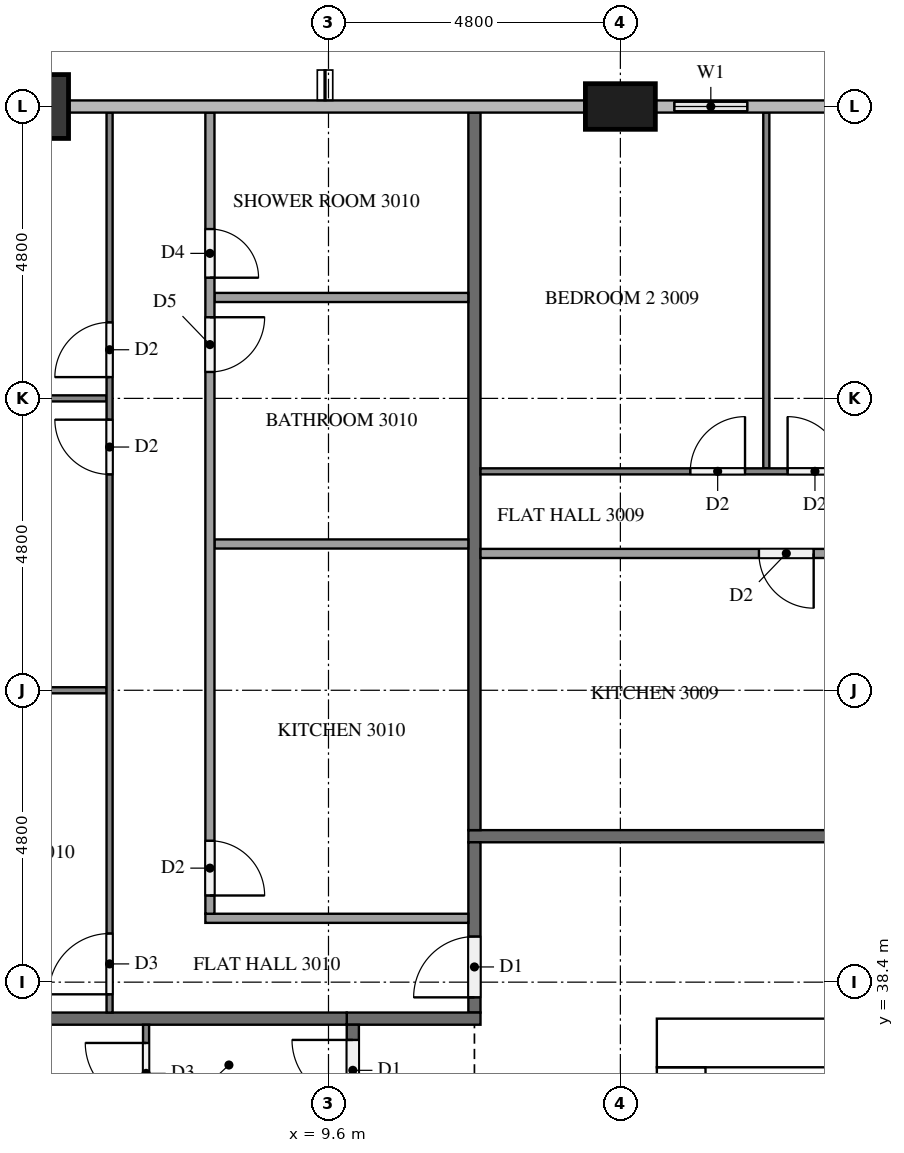
"""IFC4 building model, lengths in metres.
Left out: names, types, materials, properties, quantities, classifications, styles, units other than length and angle.
Written with IfcOpenShell. Run it as: python <this file> out.ifc"""

import sys

from ifc_helpers import new_model, si_unit, direction, frame, frame_2d, origin, origin_2d, place, context, subcontext, project, spatial, rectangle, extrude, element, fill, save


model = new_model("IFC4")
c1 = context("Model", 3, precision=1e-05, world=origin(), true_north=direction((0.0, 1.0)))
c2 = subcontext(c1, "Body", "Model", "MODEL_VIEW")
j1 = project(units=[si_unit("LENGTHUNIT", "METRE"), si_unit("PLANEANGLEUNIT", "RADIAN")], contexts=[c1])
p1 = place(None, origin())
s1 = spatial("IfcSite", under=j1, at=p1, CompositionType="ELEMENT")
p2 = place(p1, origin())
s2 = spatial("IfcBuilding", under=s1, at=p2, CompositionType="ELEMENT")
p3 = place(p2, frame((0.0, 0.0, 119.1)))
s3 = spatial("IfcBuildingStorey", under=s2, at=p3, CompositionType="ELEMENT", Elevation=119.1)
p4 = place(p3, frame((15.0, 37.4, 0.0), z_axis=(0.0, 0.0, 1.0), x_axis=(1.0, 0.0, 0.0)))
e1 = element("IfcWall", 1, at=p4, inside=s3, PredefinedType="SHEAR", context=c2, shape_type="SweptSolid", body=[
    extrude(rectangle(XDim=32.4, YDim=0.8, at=frame_2d((16.2, 0.0))), origin(), (0.0, 0.0, 1.0), 3.2),
])
p5 = place(p4, frame((15.3, 0.0, 0.0)))
e2 = element("IfcOpeningElement", 2, at=p5, cuts=e1, PredefinedType="OPENING", context=c2, shape_type="SweptSolid", body=[
    extrude(rectangle(XDim=1.8, YDim=2.1, at=frame_2d((0.9, 1.05))), frame((0.0, 0.41, 0.0), z_axis=(0.0, -1.0, 0.0), x_axis=(1.0, 0.0, 0.0)), (0.0, 0.0, 1.0), 0.82),
])
p6 = place(p4, frame((1.51, 0.0, 0.0)))
e3 = element("IfcOpeningElement", 3, at=p6, cuts=e1, PredefinedType="OPENING", context=c2, shape_type="SweptSolid", body=[
    extrude(rectangle(XDim=1.0, YDim=2.1, at=frame_2d((0.5, 1.05))), frame((0.0, 0.41, 0.0), z_axis=(0.0, -1.0, 0.0), x_axis=(1.0, 0.0, 0.0)), (0.0, 0.0, 1.0), 0.82),
])
p7 = place(p4, frame((5.11, 0.0, 0.0)))
e4 = element("IfcOpeningElement", 4, at=p7, cuts=e1, PredefinedType="OPENING", context=c2, shape_type="SweptSolid", body=[
    extrude(rectangle(XDim=1.0, YDim=2.1, at=frame_2d((0.5, 1.05))), frame((0.0, 0.41, 0.0), z_axis=(0.0, -1.0, 0.0), x_axis=(1.0, 0.0, 0.0)), (0.0, 0.0, 1.0), 0.82),
])
p8 = place(p3, frame((15.4, 15.8, 0.0), z_axis=(0.0, 0.0, 1.0), x_axis=(0.0, 1.0, 0.0)))
e5 = element("IfcWall", 5, at=p8, inside=s3, PredefinedType="SHEAR", context=c2, shape_type="SweptSolid", body=[
    extrude(rectangle(XDim=21.2, YDim=0.8, at=frame_2d((10.6, 0.0))), origin(), (0.0, 0.0, 1.0), 3.2),
])
p9 = place(p8, frame((4.96, 0.0, 0.0)))
e6 = element("IfcOpeningElement", 6, at=p9, cuts=e5, PredefinedType="OPENING", context=c2, shape_type="SweptSolid", body=[
    extrude(rectangle(XDim=1.2, YDim=2.1, at=frame_2d((0.6, 1.05))), frame((0.0, 0.41, 0.0), z_axis=(0.0, -1.0, 0.0), x_axis=(1.0, 0.0, 0.0)), (0.0, 0.0, 1.0), 0.82),
])
p10 = place(p3, frame((14.4, 52.8, 0.0), z_axis=(0.0, 0.0, 1.0), x_axis=(1.0, 0.0, 0.0)))
e7 = element("IfcColumn", 7, at=p10, inside=s3, PredefinedType="COLUMN", context=c2, shape_type="SweptSolid", body=[
    extrude(rectangle(XDim=1.15, YDim=0.75, at=origin_2d()), origin(), (0.0, 0.0, 1.0), 3.2),
])
p11 = place(p3, frame((4.8, 52.8, 0.0), z_axis=(0.0, 0.0, 1.0), x_axis=(1.0, 0.0, 0.0)))
e8 = element("IfcColumn", 8, at=p11, inside=s3, PredefinedType="COLUMN", context=c2, shape_type="SweptSolid", body=[
    extrude(rectangle(XDim=1.05, YDim=1.05, at=origin_2d()), origin(), (0.0, 0.0, 1.0), 3.2),
])
p12 = place(p3, frame((16.8, 52.8, 0.0), z_axis=(0.0, 0.0, 1.0), x_axis=(-1.0, 0.0, 0.0)))
e9 = element("IfcWall", 9, at=p12, inside=s3, PredefinedType="SOLIDWALL", context=c2, shape_type="SweptSolid", body=[
    extrude(rectangle(XDim=1.825, YDim=0.15, at=frame_2d((0.913, 0.0))), origin(), (0.0, 0.0, 1.0), 3.2),
])
p13 = place(p12, frame((0.312, 0.0, 0.9)))
e10 = element("IfcOpeningElement", 10, at=p13, cuts=e9, PredefinedType="OPENING", context=c2, shape_type="SweptSolid", body=[
    extrude(rectangle(XDim=1.2, YDim=1.4, at=frame_2d((0.6, 0.7))), frame((0.0, 0.085, 0.0), z_axis=(0.0, -1.0, 0.0), x_axis=(1.0, 0.0, 0.0)), (0.0, 0.0, 1.0), 0.17),
])
p14 = place(p3, frame((11.9, 40.8, 0.0), z_axis=(0.0, 0.0, 1.0), x_axis=(1.0, 0.0, 0.0)))
e11 = element("IfcWall", 11, at=p14, inside=s3, PredefinedType="PARTITIONING", context=c2, shape_type="SweptSolid", body=[
    extrude(rectangle(XDim=38.6, YDim=0.2, at=frame_2d((19.3, 0.0))), origin(), (0.0, 0.0, 1.0), 3.2),
])
p15 = place(p14, frame((37.15, 0.0, 0.0)))
e12 = element("IfcOpeningElement", 12, at=p15, cuts=e11, PredefinedType="OPENING", context=c2, shape_type="SweptSolid", body=[
    extrude(rectangle(XDim=1.0, YDim=2.1, at=frame_2d((0.5, 1.05))), frame((0.0, 0.11, 0.0), z_axis=(0.0, -1.0, 0.0), x_axis=(1.0, 0.0, 0.0)), (0.0, 0.0, 1.0), 0.22),
])
p16 = place(p14, frame((27.55, 0.0, 0.0)))
e13 = element("IfcOpeningElement", 13, at=p16, cuts=e11, PredefinedType="OPENING", context=c2, shape_type="SweptSolid", body=[
    extrude(rectangle(XDim=1.0, YDim=2.1, at=frame_2d((0.5, 1.05))), frame((0.0, 0.11, 0.0), z_axis=(0.0, -1.0, 0.0), x_axis=(1.0, 0.0, 0.0)), (0.0, 0.0, 1.0), 0.22),
])
p17 = place(p14, frame((13.15, 0.0, 0.0)))
e14 = element("IfcOpeningElement", 14, at=p17, cuts=e11, PredefinedType="OPENING", context=c2, shape_type="SweptSolid", body=[
    extrude(rectangle(XDim=1.0, YDim=2.1, at=frame_2d((0.5, 1.05))), frame((0.0, 0.11, 0.0), z_axis=(0.0, -1.0, 0.0), x_axis=(1.0, 0.0, 0.0)), (0.0, 0.0, 1.0), 0.22),
])
p18 = place(p3, frame((12.0, 37.9, 0.0), z_axis=(0.0, 0.0, 1.0), x_axis=(0.0, 1.0, 0.0)))
e15 = element("IfcWall", 15, at=p18, inside=s3, PredefinedType="PARTITIONING", context=c2, shape_type="SweptSolid", body=[
    extrude(rectangle(XDim=2.8, YDim=0.2, at=frame_2d((1.4, 0.0))), origin(), (0.0, 0.0, 1.0), 3.2),
])
p19 = place(p18, frame((0.25, 0.0, 0.0)))
e16 = element("IfcOpeningElement", 16, at=p19, cuts=e15, PredefinedType="OPENING", context=c2, shape_type="SweptSolid", body=[
    extrude(rectangle(XDim=1.0, YDim=2.1, at=frame_2d((0.5, 1.05))), frame((0.0, 0.11, 0.0), z_axis=(0.0, -1.0, 0.0), x_axis=(1.0, 0.0, 0.0)), (0.0, 0.0, 1.0), 0.22),
])
p20 = place(p3, frame((12.1, 37.8, 0.0), z_axis=(0.0, 0.0, 1.0), x_axis=(-1.0, 0.0, 0.0)))
e17 = element("IfcWall", 17, at=p20, inside=s3, PredefinedType="PARTITIONING", context=c2, shape_type="SweptSolid", body=[
    extrude(rectangle(XDim=2.2, YDim=0.2, at=frame_2d((1.1, 0.0))), origin(), (0.0, 0.0, 1.0), 3.2),
])
p21 = place(p3, frame((10.0, 15.1, 0.0), z_axis=(0.0, 0.0, 1.0), x_axis=(0.0, 1.0, 0.0)))
e18 = element("IfcWall", 18, at=p21, inside=s3, PredefinedType="PARTITIONING", context=c2, shape_type="SweptSolid", body=[
    extrude(rectangle(XDim=22.6, YDim=0.2, at=frame_2d((11.3, 0.0))), origin(), (0.0, 0.0, 1.0), 3.2),
])
p22 = place(p21, frame((21.35, 0.0, 0.0)))
e19 = element("IfcOpeningElement", 19, at=p22, cuts=e18, PredefinedType="OPENING", context=c2, shape_type="SweptSolid", body=[
    extrude(rectangle(XDim=1.0, YDim=2.1, at=frame_2d((0.5, 1.05))), frame((0.0, 0.11, 0.0), z_axis=(0.0, -1.0, 0.0), x_axis=(1.0, 0.0, 0.0)), (0.0, 0.0, 1.0), 0.22),
])
p23 = place(p21, frame((12.35, 0.0, 0.0)))
e20 = element("IfcOpeningElement", 20, at=p23, cuts=e18, PredefinedType="OPENING", context=c2, shape_type="SweptSolid", body=[
    extrude(rectangle(XDim=1.0, YDim=2.1, at=frame_2d((0.5, 1.05))), frame((0.0, 0.11, 0.0), z_axis=(0.0, -1.0, 0.0), x_axis=(1.0, 0.0, 0.0)), (0.0, 0.0, 1.0), 0.22),
])
p24 = place(p3, frame((12.0, 52.7, 0.0), z_axis=(0.0, 0.0, 1.0), x_axis=(0.0, -1.0, 0.0)))
e21 = element("IfcWall", 21, at=p24, inside=s3, PredefinedType="PARTITIONING", context=c2, shape_type="SweptSolid", body=[
    extrude(rectangle(XDim=11.8, YDim=0.2, at=frame_2d((5.9, 0.0))), origin(), (0.0, 0.0, 1.0), 3.2),
])
p25 = place(p3, frame((0.375, 37.8, 0.0), z_axis=(0.0, 0.0, 1.0), x_axis=(1.0, 0.0, 0.0)))
e22 = element("IfcWall", 22, at=p25, inside=s3, PredefinedType="PARTITIONING", context=c2, shape_type="SweptSolid", body=[
    extrude(rectangle(XDim=9.525, YDim=0.2, at=frame_2d((4.762, 0.0))), origin(), (0.0, 0.0, 1.0), 3.2),
])
p26 = place(p3, frame((16.8, 46.85, 0.0), z_axis=(0.0, 0.0, 1.0), x_axis=(0.0, 1.0, 0.0)))
e23 = element("IfcWall", 23, at=p26, inside=s3, PredefinedType="PARTITIONING", context=c2, shape_type="SweptSolid", body=[
    extrude(rectangle(XDim=5.85, YDim=0.1, at=frame_2d((2.925, 0.0))), origin(), (0.0, 0.0, 1.0), 3.2),
])
p27 = place(p3, frame((12.1, 46.8, 0.0), z_axis=(0.0, 0.0, 1.0), x_axis=(1.0, 0.0, 0.0)))
e24 = element("IfcWall", 24, at=p27, inside=s3, PredefinedType="PARTITIONING", context=c2, shape_type="SweptSolid", body=[
    extrude(rectangle(XDim=14.2, YDim=0.1, at=frame_2d((7.1, 0.0))), origin(), (0.0, 0.0, 1.0), 3.2),
])
p28 = place(p27, frame((12.9, 0.0, 0.0)))
e25 = element("IfcOpeningElement", 25, at=p28, cuts=e24, PredefinedType="OPENING", context=c2, shape_type="SweptSolid", body=[
    extrude(rectangle(XDim=1.0, YDim=2.1, at=frame_2d((0.5, 1.05))), frame((0.0, 0.06, 0.0), z_axis=(0.0, -1.0, 0.0), x_axis=(1.0, 0.0, 0.0)), (0.0, 0.0, 1.0), 0.12),
])
p29 = place(p27, frame((5.05, 0.0, 0.0)))
e26 = element("IfcOpeningElement", 26, at=p29, cuts=e24, PredefinedType="OPENING", context=c2, shape_type="SweptSolid", body=[
    extrude(rectangle(XDim=0.9, YDim=2.1, at=frame_2d((0.45, 1.05))), frame((0.0, 0.06, 0.0), z_axis=(0.0, -1.0, 0.0), x_axis=(1.0, 0.0, 0.0)), (0.0, 0.0, 1.0), 0.12),
])
p30 = place(p27, frame((3.45, 0.0, 0.0)))
e27 = element("IfcOpeningElement", 27, at=p30, cuts=e24, PredefinedType="OPENING", context=c2, shape_type="SweptSolid", body=[
    extrude(rectangle(XDim=0.9, YDim=2.1, at=frame_2d((0.45, 1.05))), frame((0.0, 0.06, 0.0), z_axis=(0.0, -1.0, 0.0), x_axis=(1.0, 0.0, 0.0)), (0.0, 0.0, 1.0), 0.12),
])
p31 = place(p3, frame((24.675, 45.45, 0.0), z_axis=(0.0, 0.0, 1.0), x_axis=(-1.0, 0.0, 0.0)))
e28 = element("IfcWall", 28, at=p31, inside=s3, PredefinedType="PARTITIONING", context=c2, shape_type="SweptSolid", body=[
    extrude(rectangle(XDim=12.575, YDim=0.15, at=frame_2d((6.288, 0.0))), origin(), (0.0, 0.0, 1.0), 3.2),
])
p32 = place(p31, frame((0.3, 0.0, 0.0)))
e29 = element("IfcOpeningElement", 29, at=p32, cuts=e28, PredefinedType="OPENING", context=c2, shape_type="SweptSolid", body=[
    extrude(rectangle(XDim=0.9, YDim=2.1, at=frame_2d((0.45, 1.05))), frame((0.0, 0.085, 0.0), z_axis=(0.0, -1.0, 0.0), x_axis=(1.0, 0.0, 0.0)), (0.0, 0.0, 1.0), 0.17),
])
p33 = place(p31, frame((5.646, 0.0, 0.0)))
e30 = element("IfcOpeningElement", 30, at=p33, cuts=e28, PredefinedType="OPENING", context=c2, shape_type="SweptSolid", body=[
    extrude(rectangle(XDim=0.8, YDim=2.1, at=frame_2d((0.4, 1.05))), frame((0.0, 0.085, 0.0), z_axis=(0.0, -1.0, 0.0), x_axis=(1.0, 0.0, 0.0)), (0.0, 0.0, 1.0), 0.17),
])
p34 = place(p31, frame((7.096, 0.0, 0.0)))
e31 = element("IfcOpeningElement", 31, at=p34, cuts=e28, PredefinedType="OPENING", context=c2, shape_type="SweptSolid", body=[
    extrude(rectangle(XDim=0.9, YDim=2.1, at=frame_2d((0.45, 1.05))), frame((0.0, 0.085, 0.0), z_axis=(0.0, -1.0, 0.0), x_axis=(1.0, 0.0, 0.0)), (0.0, 0.0, 1.0), 0.17),
])
p35 = place(p3, frame((5.95, 43.2, 0.0), z_axis=(0.0, 0.0, 1.0), x_axis=(-1.0, 0.0, 0.0)))
e32 = element("IfcWall", 32, at=p35, inside=s3, PredefinedType="PARTITIONING", context=c2, shape_type="SweptSolid", body=[
    extrude(rectangle(XDim=5.85, YDim=0.1, at=frame_2d((2.925, 0.0))), origin(), (0.0, 0.0, 1.0), 3.2),
])
p36 = place(p3, frame((5.95, 48.0, 0.0), z_axis=(0.0, 0.0, 1.0), x_axis=(-1.0, 0.0, 0.0)))
e33 = element("IfcWall", 33, at=p36, inside=s3, PredefinedType="PARTITIONING", context=c2, shape_type="SweptSolid", body=[
    extrude(rectangle(XDim=5.425, YDim=0.1, at=frame_2d((2.712, 0.0))), origin(), (0.0, 0.0, 1.0), 3.2),
])
p37 = place(p3, frame((6.0, 37.9, 0.0), z_axis=(0.0, 0.0, 1.0), x_axis=(0.0, 1.0, 0.0)))
e34 = element("IfcWall", 34, at=p37, inside=s3, PredefinedType="PARTITIONING", context=c2, shape_type="SweptSolid", body=[
    extrude(rectangle(XDim=14.8, YDim=0.1, at=frame_2d((7.4, 0.0))), origin(), (0.0, 0.0, 1.0), 3.2),
])
p38 = place(p37, frame((0.3, 0.0, 0.0)))
e35 = element("IfcOpeningElement", 35, at=p38, cuts=e34, PredefinedType="OPENING", context=c2, shape_type="SweptSolid", body=[
    extrude(rectangle(XDim=1.0, YDim=2.1, at=frame_2d((0.5, 1.05))), frame((0.0, 0.06, 0.0), z_axis=(0.0, -1.0, 0.0), x_axis=(1.0, 0.0, 0.0)), (0.0, 0.0, 1.0), 0.12),
])
p39 = place(p37, frame((8.85, 0.0, 0.0)))
e36 = element("IfcOpeningElement", 36, at=p39, cuts=e34, PredefinedType="OPENING", context=c2, shape_type="SweptSolid", body=[
    extrude(rectangle(XDim=0.9, YDim=2.1, at=frame_2d((0.45, 1.05))), frame((0.0, 0.06, 0.0), z_axis=(0.0, -1.0, 0.0), x_axis=(1.0, 0.0, 0.0)), (0.0, 0.0, 1.0), 0.12),
])
p40 = place(p37, frame((10.45, 0.0, 0.0)))
e37 = element("IfcOpeningElement", 37, at=p40, cuts=e34, PredefinedType="OPENING", context=c2, shape_type="SweptSolid", body=[
    extrude(rectangle(XDim=0.9, YDim=2.1, at=frame_2d((0.45, 1.05))), frame((0.0, 0.06, 0.0), z_axis=(0.0, -1.0, 0.0), x_axis=(1.0, 0.0, 0.0)), (0.0, 0.0, 1.0), 0.12),
])
for number, where, z_axis, x_axis in (
    (38, (11.9, 45.606, 0.0), (0.0, 0.0, 1.0), (-1.0, 0.0, 0.0)),
    (39, (11.9, 49.66, 0.0), (0.0, 0.0, 1.0), (-1.0, 0.0, 0.0)),
):
    element("IfcWall", number, at=place(p3, frame(where, z_axis=z_axis, x_axis=x_axis)), inside=s3, PredefinedType="PARTITIONING", context=c2, shape_type="SweptSolid", body=[
        extrude(rectangle(XDim=4.175, YDim=0.15, at=frame_2d((2.087, 0.0))), origin(), (0.0, 0.0, 1.0), 3.2),
    ])
p41 = place(p3, frame((11.9, 39.45, 0.0), z_axis=(0.0, 0.0, 1.0), x_axis=(-1.0, 0.0, 0.0)))
e40 = element("IfcWall", 40, at=p41, inside=s3, PredefinedType="PARTITIONING", context=c2, shape_type="SweptSolid", body=[
    extrude(rectangle(XDim=4.325, YDim=0.15, at=frame_2d((2.163, 0.0))), origin(), (0.0, 0.0, 1.0), 3.2),
])
p42 = place(p3, frame((7.65, 52.7, 0.0), z_axis=(0.0, 0.0, 1.0), x_axis=(0.0, -1.0, 0.0)))
e41 = element("IfcWall", 41, at=p42, inside=s3, PredefinedType="PARTITIONING", context=c2, shape_type="SweptSolid", body=[
    extrude(rectangle(XDim=13.175, YDim=0.15, at=frame_2d((6.587, 0.0))), origin(), (0.0, 0.0, 1.0), 3.2),
])
p43 = place(p42, frame((11.975, 0.0, 0.0)))
e42 = element("IfcOpeningElement", 42, at=p43, cuts=e41, PredefinedType="OPENING", context=c2, shape_type="SweptSolid", body=[
    extrude(rectangle(XDim=0.9, YDim=2.1, at=frame_2d((0.45, 1.05))), frame((0.0, 0.085, 0.0), z_axis=(0.0, -1.0, 0.0), x_axis=(1.0, 0.0, 0.0)), (0.0, 0.0, 1.0), 0.17),
])
p44 = place(p42, frame((3.365, 0.0, 0.0)))
e43 = element("IfcOpeningElement", 43, at=p44, cuts=e41, PredefinedType="OPENING", context=c2, shape_type="SweptSolid", body=[
    extrude(rectangle(XDim=0.9, YDim=2.1, at=frame_2d((0.45, 1.05))), frame((0.0, 0.085, 0.0), z_axis=(0.0, -1.0, 0.0), x_axis=(1.0, 0.0, 0.0)), (0.0, 0.0, 1.0), 0.17),
])
p45 = place(p42, frame((1.915, 0.0, 0.0)))
e44 = element("IfcOpeningElement", 44, at=p45, cuts=e41, PredefinedType="OPENING", context=c2, shape_type="SweptSolid", body=[
    extrude(rectangle(XDim=0.8, YDim=2.1, at=frame_2d((0.4, 1.05))), frame((0.0, 0.085, 0.0), z_axis=(0.0, -1.0, 0.0), x_axis=(1.0, 0.0, 0.0)), (0.0, 0.0, 1.0), 0.17),
])
p46 = place(p3, frame((6.6, 28.9, 0.0), z_axis=(0.0, 0.0, 1.0), x_axis=(0.0, 1.0, 0.0)))
e45 = element("IfcWall", 45, at=p46, inside=s3, PredefinedType="PARTITIONING", context=c2, shape_type="SweptSolid", body=[
    extrude(rectangle(XDim=8.8, YDim=0.1, at=frame_2d((4.4, 0.0))), origin(), (0.0, 0.0, 1.0), 3.2),
])
p47 = place(p46, frame((7.5, 0.0, 0.0)))
e46 = element("IfcOpeningElement", 46, at=p47, cuts=e45, PredefinedType="OPENING", context=c2, shape_type="SweptSolid", body=[
    extrude(rectangle(XDim=1.0, YDim=2.1, at=frame_2d((0.5, 1.05))), frame((0.0, 0.06, 0.0), z_axis=(0.0, -1.0, 0.0), x_axis=(1.0, 0.0, 0.0)), (0.0, 0.0, 1.0), 0.12),
])
p48 = place(p46, frame((0.3, 0.0, 0.0)))
e47 = element("IfcOpeningElement", 47, at=p48, cuts=e45, PredefinedType="OPENING", context=c2, shape_type="SweptSolid", body=[
    extrude(rectangle(XDim=0.9, YDim=2.1, at=frame_2d((0.45, 1.05))), frame((0.0, 0.06, 0.0), z_axis=(0.0, -1.0, 0.0), x_axis=(1.0, 0.0, 0.0)), (0.0, 0.0, 1.0), 0.12),
])
p49 = place(p13, origin())
e48 = element("IfcWindow", 48, at=p49, inside=s3, PartitioningType="SINGLE_PANEL", PredefinedType="WINDOW", context=c2, shape_type="SweptSolid", body=[
    extrude(rectangle(XDim=1.2, YDim=1.4, at=frame_2d((0.6, 0.7))), frame((0.0, 0.03, 0.0), z_axis=(0.0, -1.0, 0.0), x_axis=(1.0, 0.0, 0.0)), (0.0, 0.0, 1.0), 0.06),
])
fill(e10, e48)
p50 = place(p6, origin())
e49 = element("IfcDoor", 49, at=p50, inside=s3, OperationType="SINGLE_SWING_LEFT", PredefinedType="DOOR", context=c2, shape_type="SweptSolid", body=[
    extrude(rectangle(XDim=1.0, YDim=2.1, at=frame_2d((0.5, 1.05))), frame((0.0, 0.025, 0.0), z_axis=(0.0, -1.0, 0.0), x_axis=(1.0, 0.0, 0.0)), (0.0, 0.0, 1.0), 0.05),
])
fill(e3, e49)
p51 = place(p19, origin())
e50 = element("IfcDoor", 50, at=p51, inside=s3, OperationType="SINGLE_SWING_LEFT", PredefinedType="DOOR", context=c2, shape_type="SweptSolid", body=[
    extrude(rectangle(XDim=1.0, YDim=2.1, at=frame_2d((0.5, 1.05))), frame((0.0, 0.025, 0.0), z_axis=(0.0, -1.0, 0.0), x_axis=(1.0, 0.0, 0.0)), (0.0, 0.0, 1.0), 0.05),
])
fill(e16, e50)
p52 = place(p22, origin())
e51 = element("IfcDoor", 51, at=p52, inside=s3, OperationType="SINGLE_SWING_RIGHT", PredefinedType="DOOR", context=c2, shape_type="SweptSolid", body=[
    extrude(rectangle(XDim=1.0, YDim=2.1, at=frame_2d((0.5, 1.05))), frame((0.0, 0.025, 0.0), z_axis=(0.0, -1.0, 0.0), x_axis=(1.0, 0.0, 0.0)), (0.0, 0.0, 1.0), 0.05),
])
fill(e19, e51)
p53 = place(p29, origin())
e52 = element("IfcDoor", 52, at=p53, inside=s3, OperationType="SINGLE_SWING_LEFT", PredefinedType="DOOR", context=c2, shape_type="SweptSolid", body=[
    extrude(rectangle(XDim=0.9, YDim=2.1, at=frame_2d((0.45, 1.05))), frame((0.0, 0.025, 0.0), z_axis=(0.0, -1.0, 0.0), x_axis=(1.0, 0.0, 0.0)), (0.0, 0.0, 1.0), 0.05),
])
fill(e26, e52)
p54 = place(p30, origin())
e53 = element("IfcDoor", 53, at=p54, inside=s3, OperationType="SINGLE_SWING_RIGHT", PredefinedType="DOOR", context=c2, shape_type="SweptSolid", body=[
    extrude(rectangle(XDim=0.9, YDim=2.1, at=frame_2d((0.45, 1.05))), frame((0.0, 0.025, 0.0), z_axis=(0.0, -1.0, 0.0), x_axis=(1.0, 0.0, 0.0)), (0.0, 0.0, 1.0), 0.05),
])
fill(e27, e53)
p55 = place(p34, origin())
e54 = element("IfcDoor", 54, at=p55, inside=s3, OperationType="SINGLE_SWING_LEFT", PredefinedType="DOOR", context=c2, shape_type="SweptSolid", body=[
    extrude(rectangle(XDim=0.9, YDim=2.1, at=frame_2d((0.45, 1.05))), frame((0.0, 0.025, 0.0), z_axis=(0.0, -1.0, 0.0), x_axis=(1.0, 0.0, 0.0)), (0.0, 0.0, 1.0), 0.05),
])
fill(e31, e54)
p56 = place(p38, origin())
e55 = element("IfcDoor", 55, at=p56, inside=s3, OperationType="SINGLE_SWING_LEFT", PredefinedType="DOOR", context=c2, shape_type="SweptSolid", body=[
    extrude(rectangle(XDim=1.0, YDim=2.1, at=frame_2d((0.5, 1.05))), frame((0.0, 0.025, 0.0), z_axis=(0.0, -1.0, 0.0), x_axis=(1.0, 0.0, 0.0)), (0.0, 0.0, 1.0), 0.05),
])
fill(e35, e55)
p57 = place(p39, origin())
e56 = element("IfcDoor", 56, at=p57, inside=s3, OperationType="SINGLE_SWING_RIGHT", PredefinedType="DOOR", context=c2, shape_type="SweptSolid", body=[
    extrude(rectangle(XDim=0.9, YDim=2.1, at=frame_2d((0.45, 1.05))), frame((0.0, 0.025, 0.0), z_axis=(0.0, -1.0, 0.0), x_axis=(1.0, 0.0, 0.0)), (0.0, 0.0, 1.0), 0.05),
])
fill(e36, e56)
p58 = place(p40, origin())
e57 = element("IfcDoor", 57, at=p58, inside=s3, OperationType="SINGLE_SWING_LEFT", PredefinedType="DOOR", context=c2, shape_type="SweptSolid", body=[
    extrude(rectangle(XDim=0.9, YDim=2.1, at=frame_2d((0.45, 1.05))), frame((0.0, 0.025, 0.0), z_axis=(0.0, -1.0, 0.0), x_axis=(1.0, 0.0, 0.0)), (0.0, 0.0, 1.0), 0.05),
])
fill(e37, e57)
p59 = place(p43, origin())
e58 = element("IfcDoor", 58, at=p59, inside=s3, OperationType="SINGLE_SWING_RIGHT", PredefinedType="DOOR", context=c2, shape_type="SweptSolid", body=[
    extrude(rectangle(XDim=0.9, YDim=2.1, at=frame_2d((0.45, 1.05))), frame((0.0, 0.025, 0.0), z_axis=(0.0, -1.0, 0.0), x_axis=(1.0, 0.0, 0.0)), (0.0, 0.0, 1.0), 0.05),
])
fill(e42, e58)
p60 = place(p44, origin())
e59 = element("IfcDoor", 59, at=p60, inside=s3, OperationType="SINGLE_SWING_LEFT", PredefinedType="DOOR", context=c2, shape_type="SweptSolid", body=[
    extrude(rectangle(XDim=0.9, YDim=2.1, at=frame_2d((0.45, 1.05))), frame((0.0, 0.025, 0.0), z_axis=(0.0, -1.0, 0.0), x_axis=(1.0, 0.0, 0.0)), (0.0, 0.0, 1.0), 0.05),
])
fill(e43, e59)
p61 = place(p45, origin())
e60 = element("IfcDoor", 60, at=p61, inside=s3, OperationType="SINGLE_SWING_RIGHT", PredefinedType="DOOR", context=c2, shape_type="SweptSolid", body=[
    extrude(rectangle(XDim=0.8, YDim=2.1, at=frame_2d((0.4, 1.05))), frame((0.0, 0.025, 0.0), z_axis=(0.0, -1.0, 0.0), x_axis=(1.0, 0.0, 0.0)), (0.0, 0.0, 1.0), 0.05),
])
fill(e44, e60)
p62 = place(p47, origin())
e61 = element("IfcDoor", 61, at=p62, inside=s3, OperationType="SINGLE_SWING_RIGHT", PredefinedType="DOOR", context=c2, shape_type="SweptSolid", body=[
    extrude(rectangle(XDim=1.0, YDim=2.1, at=frame_2d((0.5, 1.05))), frame((0.0, 0.025, 0.0), z_axis=(0.0, -1.0, 0.0), x_axis=(1.0, 0.0, 0.0)), (0.0, 0.0, 1.0), 0.05),
])
fill(e46, e61)
save(model, sys.argv[1])
